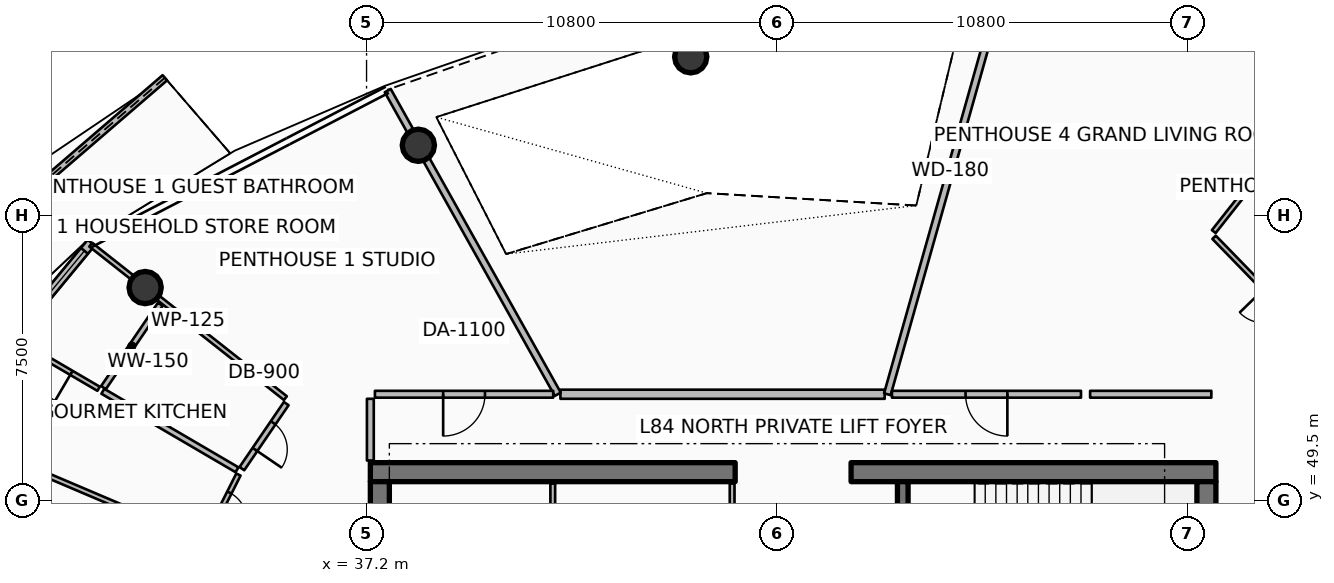
"""IFC4 building model, lengths in metres.
Left out: names, types, materials, properties, quantities, classifications, styles, units other than length and angle.
Written with IfcOpenShell. Run it as: python <this file> out.ifc"""

import sys

from ifc_helpers import new_model, si_unit, direction, frame, frame_2d, origin, origin_2d, place, context, subcontext, project, spatial, polyline, rectangle, circle, outline, extrude, element, fill, save


model = new_model("IFC4")
c1 = context("Model", 3, precision=1e-05, world=origin(), true_north=direction((0.0, 1.0)))
c2 = subcontext(c1, "Body", "Model", "MODEL_VIEW")
j1 = project(units=[si_unit("LENGTHUNIT", "METRE"), si_unit("PLANEANGLEUNIT", "RADIAN")], contexts=[c1])
p1 = place(None, origin())
s1 = spatial("IfcSite", under=j1, at=p1, CompositionType="ELEMENT")
p2 = place(p1, origin())
s2 = spatial("IfcBuilding", under=s1, at=p2, CompositionType="ELEMENT")
p3 = place(p2, frame((0.0, 0.0, 334.7)))
s3 = spatial("IfcBuildingStorey", under=s2, at=p3, CompositionType="ELEMENT", Elevation=334.7)
p4 = place(p3, frame((37.3, 50.25, 0.0), z_axis=(0.0, 0.0, 1.0), x_axis=(1.0, 0.0, 0.0)))
e1 = element("IfcWall", 1, at=p4, inside=s3, PredefinedType="SHEAR", context=c2, shape_type="SweptSolid", body=[
    extrude(rectangle(XDim=9.6, YDim=0.5, at=frame_2d((4.8, 0.0))), origin(), (0.0, 0.0, 1.0), 4.2),
])
p5 = place(p3, frame((49.95, 50.25, 0.0), z_axis=(0.0, 0.0, 1.0), x_axis=(1.0, 0.0, 0.0)))
e2 = element("IfcWall", 2, at=p5, inside=s3, PredefinedType="SHEAR", context=c2, shape_type="SweptSolid", body=[
    extrude(rectangle(XDim=9.6, YDim=0.5, at=frame_2d((4.8, 0.0))), origin(), (0.0, 0.0, 1.0), 4.2),
])
for number, where, z_axis, x_axis in (
    (3, (37.55, 34.0, 0.0), (0.0, 0.0, 1.0), (0.0, 1.0, 0.0)),
    (4, (59.3, 34.0, 0.0), (0.0, 0.0, 1.0), (0.0, 1.0, 0.0)),
):
    element("IfcWall", number, at=place(p3, frame(where, z_axis=z_axis, x_axis=x_axis)), inside=s3, PredefinedType="SHEAR", context=c2, shape_type="SweptSolid", body=[
        extrude(rectangle(XDim=16.0, YDim=0.5, at=frame_2d((8.0, 0.0))), origin(), (0.0, 0.0, 1.0), 4.2),
    ])
p6 = place(p3, frame((51.31, 46.5, 0.0), z_axis=(0.0, 0.0, 1.0), x_axis=(0.0, 1.0, 0.0)))
e5 = element("IfcWall", 5, at=p6, inside=s3, PredefinedType="SHEAR", context=c2, shape_type="SweptSolid", body=[
    extrude(rectangle(XDim=3.5, YDim=0.28, at=frame_2d((1.75, 0.0))), origin(), (0.0, 0.0, 1.0), 4.2),
])
p7 = place(p3, frame((45.73, 61.179, 0.0), z_axis=(0.0, 0.0, 1.0), x_axis=(1.0, 0.0, 0.0)))
e6 = element("IfcColumn", 6, at=p7, inside=s3, PredefinedType="COLUMN", context=c2, shape_type="SweptSolid", body=[
    extrude(circle(Radius=0.425, at=origin_2d()), origin(), (0.0, 0.0, 1.0), 4.196),
])
for number, where, z_axis, x_axis in (
    (7, (38.563, 58.851, 0.0), (0.0, 0.0, 1.0), (1.0, 0.0, 0.0)),
    (8, (31.374, 55.107, 0.0), (0.0, 0.0, 1.0), (1.0, 0.0, 0.0)),
):
    element("IfcColumn", number, at=place(p3, frame(where, z_axis=z_axis, x_axis=x_axis)), inside=s3, PredefinedType="COLUMN", context=c2, shape_type="SweptSolid", body=[
        extrude(circle(Radius=0.425, at=origin_2d()), origin(), (0.0, 0.0, 1.0), 3.94),
    ])
p8 = place(p3, frame((69.173, 60.308, 0.0), z_axis=(0.0, 0.0, 1.0), x_axis=(-0.890680467367, 0.454629854993, 0.0)))
e9 = element("IfcWall", 9, at=p8, inside=s3, PredefinedType="PARAPET", context=c2, shape_type="SweptSolid", body=[
    extrude(outline(polyline([(0.0, 0.0), (10.434, 0.0), (10.433, 1.148), (5.217, 1.284), (0.0, 1.483), (0.0, 0.0)])), frame((0.0, 0.09, 0.0), z_axis=(0.0, -1.0, 0.0), x_axis=(1.0, 0.0, 0.0)), (0.0, 0.0, 1.0), 0.18),
])
p9 = place(p3, frame((31.893, 60.627, 0.0), z_axis=(0.0, 0.0, 1.0), x_axis=(-0.757886838831, -0.652386035662, 0.0)))
e10 = element("IfcWall", 10, at=p9, inside=s3, PredefinedType="PARAPET", context=c2, shape_type="SweptSolid", body=[
    extrude(outline(polyline([(0.0, 0.0), (9.914, 0.0), (9.914, 1.632), (4.957, 1.798), (0.0, 1.86), (0.0, 0.0)])), frame((0.0, 0.09, 0.0), z_axis=(0.0, -1.0, 0.0), x_axis=(1.0, 0.0, 0.0)), (0.0, 0.0, 1.0), 0.18),
])
p10 = place(p3, frame((29.955, 56.289, 0.0), z_axis=(0.0, 0.0, 1.0), x_axis=(-0.636803612721, -0.771026042897, 0.0)))
e11 = element("IfcWall", 11, at=p10, inside=s3, PredefinedType="SOLIDWALL", context=c2, shape_type="SweptSolid", body=[
    extrude(rectangle(XDim=9.728, YDim=0.24, at=frame_2d((4.864, 0.0))), origin(), (0.0, 0.0, 1.0), 2.89),
])
p11 = place(p10, frame((7.508, 0.0, 0.0)))
e12 = element("IfcOpeningElement", 12, at=p11, cuts=e11, PredefinedType="OPENING", context=c2, shape_type="SweptSolid", body=[
    extrude(rectangle(XDim=1.45, YDim=2.15, at=frame_2d((0.725, 1.075))), frame((0.0, 0.13, 0.0), z_axis=(0.0, -1.0, 0.0), x_axis=(1.0, 0.0, 0.0)), (0.0, 0.0, 1.0), 0.26),
])
p12 = place(p10, frame((0.28, 0.0, 0.65)))
e13 = element("IfcOpeningElement", 13, at=p12, cuts=e11, PredefinedType="OPENING", context=c2, shape_type="SweptSolid", body=[
    extrude(rectangle(XDim=1.6, YDim=1.5, at=frame_2d((0.8, 0.75))), frame((0.0, 0.13, 0.0), z_axis=(0.0, -1.0, 0.0), x_axis=(1.0, 0.0, 0.0)), (0.0, 0.0, 1.0), 0.26),
])
for number, where, z_axis, x_axis in (
    (14, (46.82, 47.92, 0.0), (0.0, 0.0, 1.0), (0.0, 1.0, 0.0)),
    (15, (42.1, 47.92, 0.0), (0.0, 0.0, 1.0), (0.0, 1.0, 0.0)),
):
    element("IfcWall", number, at=place(p3, frame(where, z_axis=z_axis, x_axis=x_axis)), inside=s3, PredefinedType="PARTITIONING", context=c2, shape_type="SweptSolid", body=[
        extrude(rectangle(XDim=2.03, YDim=0.125, at=frame_2d((1.015, 0.0))), origin(), (0.0, 0.0, 1.0), 3.38),
    ])
p13 = place(p3, frame((50.835, 52.3, 0.0), z_axis=(0.0, 0.0, 1.0), x_axis=(-1.0, 0.0, 0.0)))
e16 = element("IfcWall", 16, at=p13, inside=s3, PredefinedType="SOLIDWALL", context=c2, shape_type="SweptSolid", body=[
    extrude(rectangle(XDim=8.533, YDim=0.24, at=frame_2d((4.267, 0.0))), origin(), (0.0, 0.0, 1.0), 3.38),
])
p14 = place(p3, frame((50.905, 52.3, 0.0), z_axis=(0.0, 0.0, 1.0), x_axis=(0.271453030279, 0.962451688321, 0.0)))
e17 = element("IfcWall", 17, at=p14, inside=s3, PredefinedType="PARTITIONING", context=c2, shape_type="SweptSolid", body=[
    extrude(rectangle(XDim=12.191, YDim=0.18, at=frame_2d((6.096, 0.0))), origin(), (0.0, 0.0, 1.0), 3.38),
])
p15 = place(p3, frame((42.232, 52.3, 0.0), z_axis=(0.0, 0.0, 1.0), x_axis=(-0.488623665245, 0.872494649704, 0.0)))
e18 = element("IfcWall", 18, at=p15, inside=s3, PredefinedType="PARTITIONING", context=c2, shape_type="SweptSolid", body=[
    extrude(rectangle(XDim=9.157, YDim=0.18, at=frame_2d((4.579, 0.0))), origin(), (0.0, 0.0, 1.0), 3.38),
])
p16 = place(p3, frame((42.112, 52.3, 0.0), z_axis=(0.0, 0.0, 1.0), x_axis=(-1.0, 0.0, 0.0)))
e19 = element("IfcWall", 19, at=p16, inside=s3, PredefinedType="PARTITIONING", context=c2, shape_type="SweptSolid", body=[
    extrude(rectangle(XDim=4.692, YDim=0.18, at=frame_2d((2.346, 0.0))), origin(), (0.0, 0.0, 1.0), 3.38),
])
p17 = place(p16, frame((1.796, 0.0, 0.0)))
e20 = element("IfcOpeningElement", 20, at=p17, cuts=e19, PredefinedType="OPENING", context=c2, shape_type="SweptSolid", body=[
    extrude(rectangle(XDim=1.1, YDim=2.1, at=frame_2d((0.55, 1.05))), frame((0.0, 0.1, 0.0), z_axis=(0.0, -1.0, 0.0), x_axis=(1.0, 0.0, 0.0)), (0.0, 0.0, 1.0), 0.2),
])
p18 = place(p3, frame((37.3, 52.18, 0.0), z_axis=(0.0, 0.0, 1.0), x_axis=(0.0, -1.0, 0.0)))
e21 = element("IfcWall", 21, at=p18, inside=s3, PredefinedType="PARTITIONING", context=c2, shape_type="SweptSolid", body=[
    extrude(rectangle(XDim=1.625, YDim=0.18, at=frame_2d((0.812, 0.0))), origin(), (0.0, 0.0, 1.0), 3.38),
])
p19 = place(p3, frame((35.064, 52.198, 0.0), z_axis=(0.0, 0.0, 1.0), x_axis=(-0.785319571145, 0.619090600136, 0.0)))
e22 = element("IfcWall", 22, at=p19, inside=s3, PredefinedType="PARTITIONING", context=c2, shape_type="SweptSolid", body=[
    extrude(rectangle(XDim=6.521, YDim=0.125, at=frame_2d((3.26, 0.0))), origin(), (0.0, 0.0, 1.0), 3.38),
])
p20 = place(p3, frame((35.086, 52.053, 0.0), z_axis=(0.0, 0.0, 1.0), x_axis=(-0.563373395767, -0.826202406763, 0.0)))
e23 = element("IfcWall", 23, at=p20, inside=s3, PredefinedType="PARTITIONING", context=c2, shape_type="SweptSolid", body=[
    extrude(rectangle(XDim=2.072, YDim=0.15, at=frame_2d((1.036, 0.0))), origin(), (0.0, 0.0, 1.0), 3.38),
])
p21 = place(p20, frame((0.611, 0.0, 0.0)))
e24 = element("IfcOpeningElement", 24, at=p21, cuts=e23, PredefinedType="OPENING", context=c2, shape_type="SweptSolid", body=[
    extrude(rectangle(XDim=0.85, YDim=2.06, at=frame_2d((0.425, 1.03))), frame((0.0, 0.085, 0.0), z_axis=(0.0, -1.0, 0.0), x_axis=(1.0, 0.0, 0.0)), (0.0, 0.0, 1.0), 0.17),
])
p22 = place(p3, frame((31.772, 54.666, 0.0), z_axis=(0.0, 0.0, 1.0), x_axis=(-0.563393907047, -0.826188420097, 0.0)))
e25 = element("IfcWall", 25, at=p22, inside=s3, PredefinedType="PARTITIONING", context=c2, shape_type="SweptSolid", body=[
    extrude(rectangle(XDim=2.654, YDim=0.15, at=frame_2d((1.327, 0.0))), origin(), (0.0, 0.0, 1.0), 3.38),
])
p23 = place(p3, frame((33.791, 50.313, 0.0), z_axis=(0.0, 0.0, 1.0), x_axis=(-0.863113475275, 0.505010028413, 0.0)))
e26 = element("IfcWall", 26, at=p23, inside=s3, PredefinedType="PARTITIONING", context=c2, shape_type="SweptSolid", body=[
    extrude(rectangle(XDim=4.09, YDim=0.15, at=frame_2d((2.045, 0.0))), origin(), (0.0, 0.0, 1.0), 3.38),
])
p24 = place(p3, frame((30.149, 52.444, 0.0), z_axis=(0.0, 0.0, 1.0), x_axis=(-0.863096282512, 0.505039411446, 0.0)))
e27 = element("IfcWall", 27, at=p24, inside=s3, PredefinedType="PARTITIONING", context=c2, shape_type="SweptSolid", body=[
    extrude(rectangle(XDim=2.507, YDim=0.125, at=frame_2d((1.253, 0.0))), origin(), (0.0, 0.0, 1.0), 3.38),
])
p25 = place(p24, frame((0.828, 0.0, 0.0)))
e28 = element("IfcOpeningElement", 28, at=p25, cuts=e27, PredefinedType="OPENING", context=c2, shape_type="SweptSolid", body=[
    extrude(rectangle(XDim=0.85, YDim=2.06, at=frame_2d((0.425, 1.03))), frame((0.0, 0.073, 0.0), z_axis=(0.0, -1.0, 0.0), x_axis=(1.0, 0.0, 0.0)), (0.0, 0.0, 1.0), 0.145),
])
p26 = place(p3, frame((32.851, 48.443, 0.0), z_axis=(0.0, 0.0, 1.0), x_axis=(-0.92023815321, 0.391358839655, 0.0)))
e29 = element("IfcWall", 29, at=p26, inside=s3, PredefinedType="PARTITIONING", context=c2, shape_type="SweptSolid", body=[
    extrude(rectangle(XDim=7.416, YDim=0.125, at=frame_2d((3.708, 0.0))), origin(), (0.0, 0.0, 1.0), 3.38),
])
p27 = place(p3, frame((33.828, 50.187, 0.0), z_axis=(0.0, 0.0, 1.0), x_axis=(-0.449051769977, -0.893505740262, 0.0)))
e30 = element("IfcWall", 30, at=p27, inside=s3, PredefinedType="PARTITIONING", context=c2, shape_type="SweptSolid", body=[
    extrude(rectangle(XDim=1.912, YDim=0.125, at=frame_2d((0.956, 0.0))), origin(), (0.0, 0.0, 1.0), 3.38),
])
p28 = place(p27, frame((0.531, 0.0, 0.0)))
e31 = element("IfcOpeningElement", 31, at=p28, cuts=e30, PredefinedType="OPENING", context=c2, shape_type="SweptSolid", body=[
    extrude(rectangle(XDim=0.85, YDim=2.06, at=frame_2d((0.425, 1.03))), frame((0.0, 0.073, 0.0), z_axis=(0.0, -1.0, 0.0), x_axis=(1.0, 0.0, 0.0)), (0.0, 0.0, 1.0), 0.145),
])
p29 = place(p3, frame((56.0, 52.3, 0.0), z_axis=(0.0, 0.0, 1.0), x_axis=(-1.0, 0.0, 0.0)))
e32 = element("IfcWall", 32, at=p29, inside=s3, PredefinedType="PARTITIONING", context=c2, shape_type="SweptSolid", body=[
    extrude(rectangle(XDim=4.975, YDim=0.18, at=frame_2d((2.488, 0.0))), origin(), (0.0, 0.0, 1.0), 3.38),
])
p30 = place(p29, frame((1.938, 0.0, 0.0)))
e33 = element("IfcOpeningElement", 33, at=p30, cuts=e32, PredefinedType="OPENING", context=c2, shape_type="SweptSolid", body=[
    extrude(rectangle(XDim=1.1, YDim=2.1, at=frame_2d((0.55, 1.05))), frame((0.0, 0.1, 0.0), z_axis=(0.0, -1.0, 0.0), x_axis=(1.0, 0.0, 0.0)), (0.0, 0.0, 1.0), 0.2),
])
p31 = place(p3, frame((59.43, 52.3, 0.0), z_axis=(0.0, 0.0, 1.0), x_axis=(-1.0, 0.0, 0.0)))
e34 = element("IfcWall", 34, at=p31, inside=s3, PredefinedType="PARTITIONING", context=c2, shape_type="SweptSolid", body=[
    extrude(rectangle(XDim=3.19, YDim=0.18, at=frame_2d((1.595, 0.0))), origin(), (0.0, 0.0, 1.0), 3.38),
])
p32 = place(p3, frame((59.494, 56.58, 0.0), z_axis=(0.0, 0.0, 1.0), x_axis=(0.619074661851, 0.785332135503, 0.0)))
e35 = element("IfcWall", 35, at=p32, inside=s3, PredefinedType="PARTITIONING", context=c2, shape_type="SweptSolid", body=[
    extrude(rectangle(XDim=6.561, YDim=0.125, at=frame_2d((3.281, 0.0))), origin(), (0.0, 0.0, 1.0), 3.38),
])
p33 = place(p3, frame((62.763, 53.075, 0.0), z_axis=(0.0, 0.0, 1.0), x_axis=(-0.69701729014, 0.717054319592, 0.0)))
e36 = element("IfcWall", 36, at=p33, inside=s3, PredefinedType="PARTITIONING", context=c2, shape_type="SweptSolid", body=[
    extrude(rectangle(XDim=4.679, YDim=0.125, at=frame_2d((2.339, 0.0))), origin(), (0.0, 0.0, 1.0), 3.38),
])
p34 = place(p33, frame((1.889, 0.0, 0.0)))
e37 = element("IfcOpeningElement", 37, at=p34, cuts=e36, PredefinedType="OPENING", context=c2, shape_type="SweptSolid", body=[
    extrude(rectangle(XDim=0.9, YDim=2.08, at=frame_2d((0.45, 1.04))), frame((0.0, 0.073, 0.0), z_axis=(0.0, -1.0, 0.0), x_axis=(1.0, 0.0, 0.0)), (0.0, 0.0, 1.0), 0.145),
])
p35 = place(p12, origin())
e38 = element("IfcWindow", 38, at=p35, inside=s3, PartitioningType="SINGLE_PANEL", PredefinedType="WINDOW", context=c2, shape_type="SweptSolid", body=[
    extrude(rectangle(XDim=1.6, YDim=1.5, at=frame_2d((0.8, 0.75))), frame((0.0, 0.03, 0.0), z_axis=(0.0, -1.0, 0.0), x_axis=(1.0, 0.0, 0.0)), (0.0, 0.0, 1.0), 0.06),
])
fill(e13, e38)
p36 = place(p17, origin())
e39 = element("IfcDoor", 39, at=p36, inside=s3, OperationType="SINGLE_SWING_RIGHT", PredefinedType="DOOR", context=c2, shape_type="SweptSolid", body=[
    extrude(rectangle(XDim=1.1, YDim=2.1, at=frame_2d((0.55, 1.05))), frame((0.0, 0.025, 0.0), z_axis=(0.0, -1.0, 0.0), x_axis=(1.0, 0.0, 0.0)), (0.0, 0.0, 1.0), 0.05),
])
fill(e20, e39)
p37 = place(p21, origin())
e40 = element("IfcDoor", 40, at=p37, inside=s3, OperationType="SINGLE_SWING_RIGHT", PredefinedType="DOOR", context=c2, shape_type="SweptSolid", body=[
    extrude(rectangle(XDim=0.85, YDim=2.06, at=frame_2d((0.425, 1.03))), frame((0.0, 0.025, 0.0), z_axis=(0.0, -1.0, 0.0), x_axis=(1.0, 0.0, 0.0)), (0.0, 0.0, 1.0), 0.05),
])
fill(e24, e40)
p38 = place(p25, origin())
e41 = element("IfcDoor", 41, at=p38, inside=s3, OperationType="SINGLE_SWING_LEFT", PredefinedType="DOOR", context=c2, shape_type="SweptSolid", body=[
    extrude(rectangle(XDim=0.85, YDim=2.06, at=frame_2d((0.425, 1.03))), frame((0.0, 0.025, 0.0), z_axis=(0.0, -1.0, 0.0), x_axis=(1.0, 0.0, 0.0)), (0.0, 0.0, 1.0), 0.05),
])
fill(e28, e41)
p39 = place(p28, origin())
e42 = element("IfcDoor", 42, at=p39, inside=s3, OperationType="SINGLE_SWING_RIGHT", PredefinedType="DOOR", context=c2, shape_type="SweptSolid", body=[
    extrude(rectangle(XDim=0.85, YDim=2.06, at=frame_2d((0.425, 1.03))), frame((0.0, 0.025, 0.0), z_axis=(0.0, -1.0, 0.0), x_axis=(1.0, 0.0, 0.0)), (0.0, 0.0, 1.0), 0.05),
])
fill(e31, e42)
p40 = place(p30, origin())
e43 = element("IfcDoor", 43, at=p40, inside=s3, OperationType="SINGLE_SWING_LEFT", PredefinedType="DOOR", context=c2, shape_type="SweptSolid", body=[
    extrude(rectangle(XDim=1.1, YDim=2.1, at=frame_2d((0.55, 1.05))), frame((0.0, 0.025, 0.0), z_axis=(0.0, -1.0, 0.0), x_axis=(1.0, 0.0, 0.0)), (0.0, 0.0, 1.0), 0.05),
])
fill(e33, e43)
save(model, sys.argv[1])
